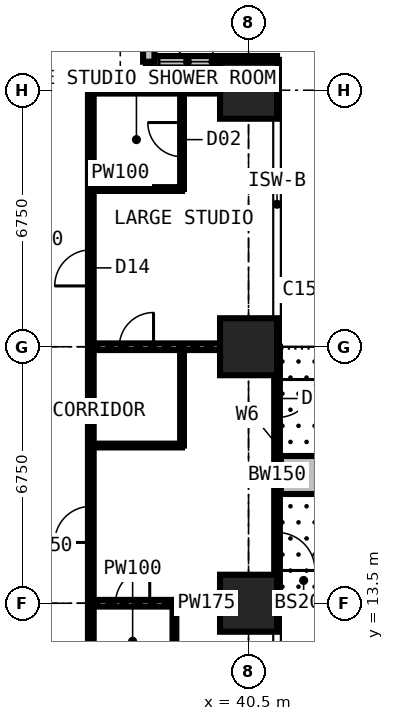
"""IFC4 building model, lengths in metres.
Left out: names, types, materials, properties, quantities, classifications, styles, units other than length and angle.
Written with IfcOpenShell. Run it as: python <this file> out.ifc"""

import sys

from ifc_helpers import new_model, si_unit, direction, frame, frame_2d, origin, origin_2d, place, context, subcontext, project, spatial, rectangle, extrude, element, fill, save


model = new_model("IFC4")
c1 = context("Model", 3, precision=1e-05, world=origin(), true_north=direction((0.0, 1.0)))
c2 = subcontext(c1, "Body", "Model", "MODEL_VIEW")
j1 = project(units=[si_unit("LENGTHUNIT", "METRE"), si_unit("PLANEANGLEUNIT", "RADIAN")], contexts=[c1])
p1 = place(None, origin())
s1 = spatial("IfcSite", under=j1, at=p1, CompositionType="ELEMENT")
p2 = place(p1, origin())
s2 = spatial("IfcBuilding", under=s1, at=p2, CompositionType="ELEMENT")
p3 = place(p2, frame((0.0, 0.0, 116.1)))
s3 = spatial("IfcBuildingStorey", under=s2, at=p3, CompositionType="ELEMENT", Elevation=116.1)
for number, where, z_axis, x_axis in (
    (1, (40.5, 13.5, 0.0), (0.0, 0.0, 1.0), (1.0, 0.0, 0.0)),
    (2, (40.5, 20.25, 0.0), (0.0, 0.0, 1.0), (1.0, 0.0, 0.0)),
    (3, (40.5, 27.0, 0.0), (0.0, 0.0, 1.0), (1.0, 0.0, 0.0)),
):
    element("IfcColumn", number, at=place(p3, frame(where, z_axis=z_axis, x_axis=x_axis)), inside=s3, PredefinedType="COLUMN", context=c2, shape_type="SweptSolid", body=[
        extrude(rectangle(XDim=1.5, YDim=1.5, at=origin_2d()), origin(), (0.0, 0.0, 1.0), 3.6),
    ])
p4 = place(p3, frame((41.25, 20.25, 0.0), z_axis=(0.0, 0.0, 1.0), x_axis=(0.0, -1.0, 0.0)))
e4 = element("IfcWall", 4, at=p4, inside=s3, PredefinedType="SOLIDWALL", context=c2, shape_type="SweptSolid", body=[
    extrude(rectangle(XDim=6.75, YDim=0.15, at=frame_2d((3.375, 0.0))), origin(), (0.0, 0.0, 1.0), 3.375),
])
p5 = place(p4, frame((0.863, 0.0, 0.0)))
e5 = element("IfcOpeningElement", 5, at=p5, cuts=e4, PredefinedType="OPENING", context=c2, shape_type="SweptSolid", body=[
    extrude(rectangle(XDim=1.0, YDim=2.2, at=frame_2d((0.5, 1.1))), frame((0.0, 0.085, 0.0), z_axis=(0.0, -1.0, 0.0), x_axis=(1.0, 0.0, 0.0)), (0.0, 0.0, 1.0), 0.17),
])
p6 = place(p4, frame((1.975, 0.0, 0.9)))
e6 = element("IfcOpeningElement", 6, at=p6, cuts=e4, PredefinedType="OPENING", context=c2, shape_type="SweptSolid", body=[
    extrude(rectangle(XDim=1.2, YDim=1.8, at=frame_2d((0.6, 0.9))), frame((0.0, 0.085, 0.0), z_axis=(0.0, -1.0, 0.0), x_axis=(1.0, 0.0, 0.0)), (0.0, 0.0, 1.0), 0.17),
])
p7 = place(p4, frame((4.887, 0.0, 0.0)))
e7 = element("IfcOpeningElement", 7, at=p7, cuts=e4, PredefinedType="OPENING", context=c2, shape_type="SweptSolid", body=[
    extrude(rectangle(XDim=1.0, YDim=2.2, at=frame_2d((0.5, 1.1))), frame((0.0, 0.085, 0.0), z_axis=(0.0, -1.0, 0.0), x_axis=(1.0, 0.0, 0.0)), (0.0, 0.0, 1.0), 0.17),
])
p8 = place(p4, frame((3.575, 0.0, 0.9)))
e8 = element("IfcOpeningElement", 8, at=p8, cuts=e4, PredefinedType="OPENING", context=c2, shape_type="SweptSolid", body=[
    extrude(rectangle(XDim=1.2, YDim=1.8, at=frame_2d((0.6, 0.9))), frame((0.0, 0.085, 0.0), z_axis=(0.0, -1.0, 0.0), x_axis=(1.0, 0.0, 0.0)), (0.0, 0.0, 1.0), 0.17),
])
p9 = place(p3, frame((41.25, 27.75, 0.0), z_axis=(0.0, 0.0, 1.0), x_axis=(-1.0, 0.0, 0.0)))
e9 = element("IfcWall", 9, at=p9, inside=s3, PredefinedType="SOLIDWALL", context=c2, shape_type="SweptSolid", body=[
    extrude(rectangle(XDim=3.375, YDim=0.3, at=frame_2d((1.688, 0.0))), origin(), (0.0, 0.0, 1.0), 3.375),
])
p10 = place(p9, frame((1.607, 0.0, 0.9)))
e10 = element("IfcOpeningElement", 10, at=p10, cuts=e9, PredefinedType="OPENING", context=c2, shape_type="SweptSolid", body=[
    extrude(rectangle(XDim=1.5, YDim=1.8, at=frame_2d((0.75, 0.9))), frame((0.0, 0.16, 0.0), z_axis=(0.0, -1.0, 0.0), x_axis=(1.0, 0.0, 0.0)), (0.0, 0.0, 1.0), 0.32),
])
p11 = place(p3, frame((37.875, 27.75, 0.0), z_axis=(0.0, 0.0, 1.0), x_axis=(0.0, 1.0, 0.0)))
e11 = element("IfcWall", 11, at=p11, inside=s3, PredefinedType="SOLIDWALL", context=c2, shape_type="SweptSolid", body=[
    extrude(rectangle(XDim=3.375, YDim=0.3, at=frame_2d((1.688, 0.0))), origin(), (0.0, 0.0, 1.0), 3.375),
])
p12 = place(p11, frame((0.788, 0.0, 0.6)))
e12 = element("IfcOpeningElement", 12, at=p12, cuts=e11, PredefinedType="OPENING", context=c2, shape_type="SweptSolid", body=[
    extrude(rectangle(XDim=1.8, YDim=2.1, at=frame_2d((0.9, 1.05))), frame((0.0, 0.16, 0.0), z_axis=(0.0, -1.0, 0.0), x_axis=(1.0, 0.0, 0.0)), (0.0, 0.0, 1.0), 0.32),
])
p13 = place(p3, frame((41.35, 16.875, 0.0), z_axis=(0.0, 0.0, 1.0), x_axis=(1.0, 0.0, 0.0)))
e13 = element("IfcWall", 13, at=p13, inside=s3, PredefinedType="USERDEFINED", context=c2, shape_type="SweptSolid", body=[
    extrude(rectangle(XDim=2.2, YDim=1.0, at=frame_2d((1.1, 0.0))), origin(), (0.0, 0.0, 1.0), 0.9),
])
p14 = place(p3, frame((36.35, 6.75, 0.0), z_axis=(0.0, 0.0, 1.0), x_axis=(0.0, 1.0, 0.0)))
e14 = element("IfcWall", 14, at=p14, inside=s3, PredefinedType="PARTITIONING", context=c2, shape_type="SweptSolid", body=[
    extrude(rectangle(XDim=20.25, YDim=0.15, at=frame_2d((10.125, 0.0))), origin(), (0.0, 0.0, 1.0), 3.375),
])
p15 = place(p14, frame((15.1, 0.0, 0.0)))
e15 = element("IfcOpeningElement", 15, at=p15, cuts=e14, PredefinedType="OPENING", context=c2, shape_type="SweptSolid", body=[
    extrude(rectangle(XDim=0.95, YDim=2.2, at=frame_2d((0.475, 1.1))), frame((0.0, 0.085, 0.0), z_axis=(0.0, -1.0, 0.0), x_axis=(1.0, 0.0, 0.0)), (0.0, 0.0, 1.0), 0.17),
])
p16 = place(p14, frame((8.35, 0.0, 0.0)))
e16 = element("IfcOpeningElement", 16, at=p16, cuts=e14, PredefinedType="OPENING", context=c2, shape_type="SweptSolid", body=[
    extrude(rectangle(XDim=0.95, YDim=2.2, at=frame_2d((0.475, 1.1))), frame((0.0, 0.085, 0.0), z_axis=(0.0, -1.0, 0.0), x_axis=(1.0, 0.0, 0.0)), (0.0, 0.0, 1.0), 0.17),
])
p17 = place(p14, frame((3.575, 0.0, 0.0)))
e17 = element("IfcOpeningElement", 17, at=p17, cuts=e14, PredefinedType="OPENING", context=c2, shape_type="SweptSolid", body=[
    extrude(rectangle(XDim=0.95, YDim=2.2, at=frame_2d((0.475, 1.1))), frame((0.0, 0.085, 0.0), z_axis=(0.0, -1.0, 0.0), x_axis=(1.0, 0.0, 0.0)), (0.0, 0.0, 1.0), 0.17),
])
p18 = place(p3, frame((36.35, 13.5, 0.0), z_axis=(0.0, 0.0, 1.0), x_axis=(1.0, 0.0, 0.0)))
e18 = element("IfcWall", 18, at=p18, inside=s3, PredefinedType="PARTITIONING", context=c2, shape_type="SweptSolid", body=[
    extrude(rectangle(XDim=4.884, YDim=0.175, at=frame_2d((2.442, 0.0))), origin(), (0.0, 0.0, 1.0), 2.877),
])
p19 = place(p18, frame((0.65, 0.0, 0.0)))
e19 = element("IfcOpeningElement", 19, at=p19, cuts=e18, PredefinedType="OPENING", context=c2, shape_type="SweptSolid", body=[
    extrude(rectangle(XDim=0.9, YDim=2.2, at=frame_2d((0.45, 1.1))), frame((0.0, 0.097, 0.0), z_axis=(0.0, -1.0, 0.0), x_axis=(1.0, 0.0, 0.0)), (0.0, 0.0, 1.0), 0.195),
])
p20 = place(p3, frame((36.35, 17.65, 0.0), z_axis=(0.0, 0.0, 1.0), x_axis=(1.0, 0.0, 0.0)))
e20 = element("IfcWall", 20, at=p20, inside=s3, PredefinedType="PARTITIONING", context=c2, shape_type="SweptSolid", body=[
    extrude(rectangle(XDim=2.4, YDim=0.1, at=frame_2d((1.2, 0.0))), origin(), (0.0, 0.0, 1.0), 3.375),
])
p21 = place(p3, frame((36.35, 20.25, 0.0), z_axis=(0.0, 0.0, 1.0), x_axis=(1.0, 0.0, 0.0)))
e21 = element("IfcWall", 21, at=p21, inside=s3, PredefinedType="PARTITIONING", context=c2, shape_type="SweptSolid", body=[
    extrude(rectangle(XDim=4.884, YDim=0.175, at=frame_2d((2.442, 0.0))), origin(), (0.0, 0.0, 1.0), 2.877),
])
p22 = place(p21, frame((0.75, 0.0, 0.0)))
e22 = element("IfcOpeningElement", 22, at=p22, cuts=e21, PredefinedType="OPENING", context=c2, shape_type="SweptSolid", body=[
    extrude(rectangle(XDim=0.9, YDim=2.2, at=frame_2d((0.45, 1.1))), frame((0.0, 0.097, 0.0), z_axis=(0.0, -1.0, 0.0), x_axis=(1.0, 0.0, 0.0)), (0.0, 0.0, 1.0), 0.195),
])
p23 = place(p3, frame((36.35, 24.4, 0.0), z_axis=(0.0, 0.0, 1.0), x_axis=(1.0, 0.0, 0.0)))
e23 = element("IfcWall", 23, at=p23, inside=s3, PredefinedType="PARTITIONING", context=c2, shape_type="SweptSolid", body=[
    extrude(rectangle(XDim=2.4, YDim=0.1, at=frame_2d((1.2, 0.0))), origin(), (0.0, 0.0, 1.0), 3.375),
])
p24 = place(p3, frame((36.35, 27.0, 0.0), z_axis=(0.0, 0.0, 1.0), x_axis=(1.0, 0.0, 0.0)))
e24 = element("IfcWall", 24, at=p24, inside=s3, PredefinedType="PARTITIONING", context=c2, shape_type="SweptSolid", body=[
    extrude(rectangle(XDim=4.884, YDim=0.175, at=frame_2d((2.442, 0.0))), origin(), (0.0, 0.0, 1.0), 2.877),
])
p25 = place(p3, frame((37.875, 27.0, 0.0), z_axis=(0.0, 0.0, 1.0), x_axis=(0.0, 1.0, 0.0)))
e25 = element("IfcWall", 25, at=p25, inside=s3, PredefinedType="PARTITIONING", context=c2, shape_type="SweptSolid", body=[
    extrude(rectangle(XDim=0.734, YDim=0.15, at=frame_2d((0.367, 0.0))), origin(), (0.0, 0.0, 1.0), 3.375),
])
p26 = place(p3, frame((38.55, 11.5, 0.0), z_axis=(0.0, 0.0, 1.0), x_axis=(0.0, 1.0, 0.0)))
e26 = element("IfcWall", 26, at=p26, inside=s3, PredefinedType="PARTITIONING", context=c2, shape_type="SweptSolid", body=[
    extrude(rectangle(XDim=2.0, YDim=0.1, at=frame_2d((1.0, 0.0))), origin(), (0.0, 0.0, 1.0), 3.375),
])
p27 = place(p3, frame((38.75, 17.65, 0.0), z_axis=(0.0, 0.0, 1.0), x_axis=(0.0, 1.0, 0.0)))
e27 = element("IfcWall", 27, at=p27, inside=s3, PredefinedType="PARTITIONING", context=c2, shape_type="SweptSolid", body=[
    extrude(rectangle(XDim=2.6, YDim=0.1, at=frame_2d((1.3, 0.0))), origin(), (0.0, 0.0, 1.0), 3.375),
])
p28 = place(p3, frame((38.75, 24.4, 0.0), z_axis=(0.0, 0.0, 1.0), x_axis=(0.0, 1.0, 0.0)))
e28 = element("IfcWall", 28, at=p28, inside=s3, PredefinedType="PARTITIONING", context=c2, shape_type="SweptSolid", body=[
    extrude(rectangle(XDim=2.6, YDim=0.1, at=frame_2d((1.3, 0.0))), origin(), (0.0, 0.0, 1.0), 3.375),
])
p29 = place(p28, frame((0.85, 0.0, 0.0)))
e29 = element("IfcOpeningElement", 29, at=p29, cuts=e28, PredefinedType="OPENING", context=c2, shape_type="SweptSolid", body=[
    extrude(rectangle(XDim=0.9, YDim=2.2, at=frame_2d((0.45, 1.1))), frame((0.0, 0.06, 0.0), z_axis=(0.0, -1.0, 0.0), x_axis=(1.0, 0.0, 0.0)), (0.0, 0.0, 1.0), 0.12),
])
p30 = place(p5, origin())
e30 = element("IfcDoor", 30, at=p30, inside=s3, OperationType="SINGLE_SWING_LEFT", PredefinedType="DOOR", context=c2, shape_type="SweptSolid", body=[
    extrude(rectangle(XDim=1.0, YDim=2.2, at=frame_2d((0.5, 1.1))), frame((0.0, 0.025, 0.0), z_axis=(0.0, -1.0, 0.0), x_axis=(1.0, 0.0, 0.0)), (0.0, 0.0, 1.0), 0.05),
])
fill(e5, e30)
p31 = place(p6, origin())
e31 = element("IfcWindow", 31, at=p31, inside=s3, PartitioningType="SINGLE_PANEL", PredefinedType="WINDOW", context=c2, shape_type="SweptSolid", body=[
    extrude(rectangle(XDim=1.2, YDim=1.8, at=frame_2d((0.6, 0.9))), frame((0.0, 0.03, 0.0), z_axis=(0.0, -1.0, 0.0), x_axis=(1.0, 0.0, 0.0)), (0.0, 0.0, 1.0), 0.06),
])
fill(e6, e31)
p32 = place(p7, origin())
e32 = element("IfcDoor", 32, at=p32, inside=s3, OperationType="SINGLE_SWING_RIGHT", PredefinedType="DOOR", context=c2, shape_type="SweptSolid", body=[
    extrude(rectangle(XDim=1.0, YDim=2.2, at=frame_2d((0.5, 1.1))), frame((0.0, 0.025, 0.0), z_axis=(0.0, -1.0, 0.0), x_axis=(1.0, 0.0, 0.0)), (0.0, 0.0, 1.0), 0.05),
])
fill(e7, e32)
p33 = place(p8, origin())
e33 = element("IfcWindow", 33, at=p33, inside=s3, PartitioningType="SINGLE_PANEL", PredefinedType="WINDOW", context=c2, shape_type="SweptSolid", body=[
    extrude(rectangle(XDim=1.2, YDim=1.8, at=frame_2d((0.6, 0.9))), frame((0.0, 0.03, 0.0), z_axis=(0.0, -1.0, 0.0), x_axis=(1.0, 0.0, 0.0)), (0.0, 0.0, 1.0), 0.06),
])
fill(e8, e33)
p34 = place(p10, origin())
e34 = element("IfcWindow", 34, at=p34, inside=s3, PartitioningType="SINGLE_PANEL", PredefinedType="WINDOW", context=c2, shape_type="SweptSolid", body=[
    extrude(rectangle(XDim=1.5, YDim=1.8, at=frame_2d((0.75, 0.9))), frame((0.0, 0.03, 0.0), z_axis=(0.0, -1.0, 0.0), x_axis=(1.0, 0.0, 0.0)), (0.0, 0.0, 1.0), 0.06),
])
fill(e10, e34)
p35 = place(p15, origin())
e35 = element("IfcDoor", 35, at=p35, inside=s3, OperationType="SINGLE_SWING_LEFT", PredefinedType="DOOR", context=c2, shape_type="SweptSolid", body=[
    extrude(rectangle(XDim=0.95, YDim=2.2, at=frame_2d((0.475, 1.1))), frame((0.0, 0.025, 0.0), z_axis=(0.0, -1.0, 0.0), x_axis=(1.0, 0.0, 0.0)), (0.0, 0.0, 1.0), 0.05),
])
fill(e15, e35)
p36 = place(p29, origin())
e36 = element("IfcDoor", 36, at=p36, inside=s3, OperationType="SINGLE_SWING_RIGHT", PredefinedType="DOOR", context=c2, shape_type="SweptSolid", body=[
    extrude(rectangle(XDim=0.9, YDim=2.2, at=frame_2d((0.45, 1.1))), frame((0.0, 0.025, 0.0), z_axis=(0.0, -1.0, 0.0), x_axis=(1.0, 0.0, 0.0)), (0.0, 0.0, 1.0), 0.05),
])
fill(e29, e36)
p37 = place(p16, origin())
e37 = element("IfcDoor", 37, at=p37, inside=s3, OperationType="SINGLE_SWING_LEFT", PredefinedType="DOOR", context=c2, shape_type="SweptSolid", body=[
    extrude(rectangle(XDim=0.95, YDim=2.2, at=frame_2d((0.475, 1.1))), frame((0.0, 0.025, 0.0), z_axis=(0.0, -1.0, 0.0), x_axis=(1.0, 0.0, 0.0)), (0.0, 0.0, 1.0), 0.05),
])
fill(e16, e37)
p38 = place(p22, origin())
e38 = element("IfcDoor", 38, at=p38, inside=s3, OperationType="SINGLE_SWING_RIGHT", PredefinedType="DOOR", context=c2, shape_type="SweptSolid", body=[
    extrude(rectangle(XDim=0.9, YDim=2.2, at=frame_2d((0.45, 1.1))), frame((0.0, 0.025, 0.0), z_axis=(0.0, -1.0, 0.0), x_axis=(1.0, 0.0, 0.0)), (0.0, 0.0, 1.0), 0.05),
])
fill(e22, e38)
p39 = place(p19, origin())
e39 = element("IfcDoor", 39, at=p39, inside=s3, OperationType="SINGLE_SWING_RIGHT", PredefinedType="DOOR", context=c2, shape_type="SweptSolid", body=[
    extrude(rectangle(XDim=0.9, YDim=2.2, at=frame_2d((0.45, 1.1))), frame((0.0, 0.025, 0.0), z_axis=(0.0, -1.0, 0.0), x_axis=(1.0, 0.0, 0.0)), (0.0, 0.0, 1.0), 0.05),
])
fill(e19, e39)
save(model, sys.argv[1])
